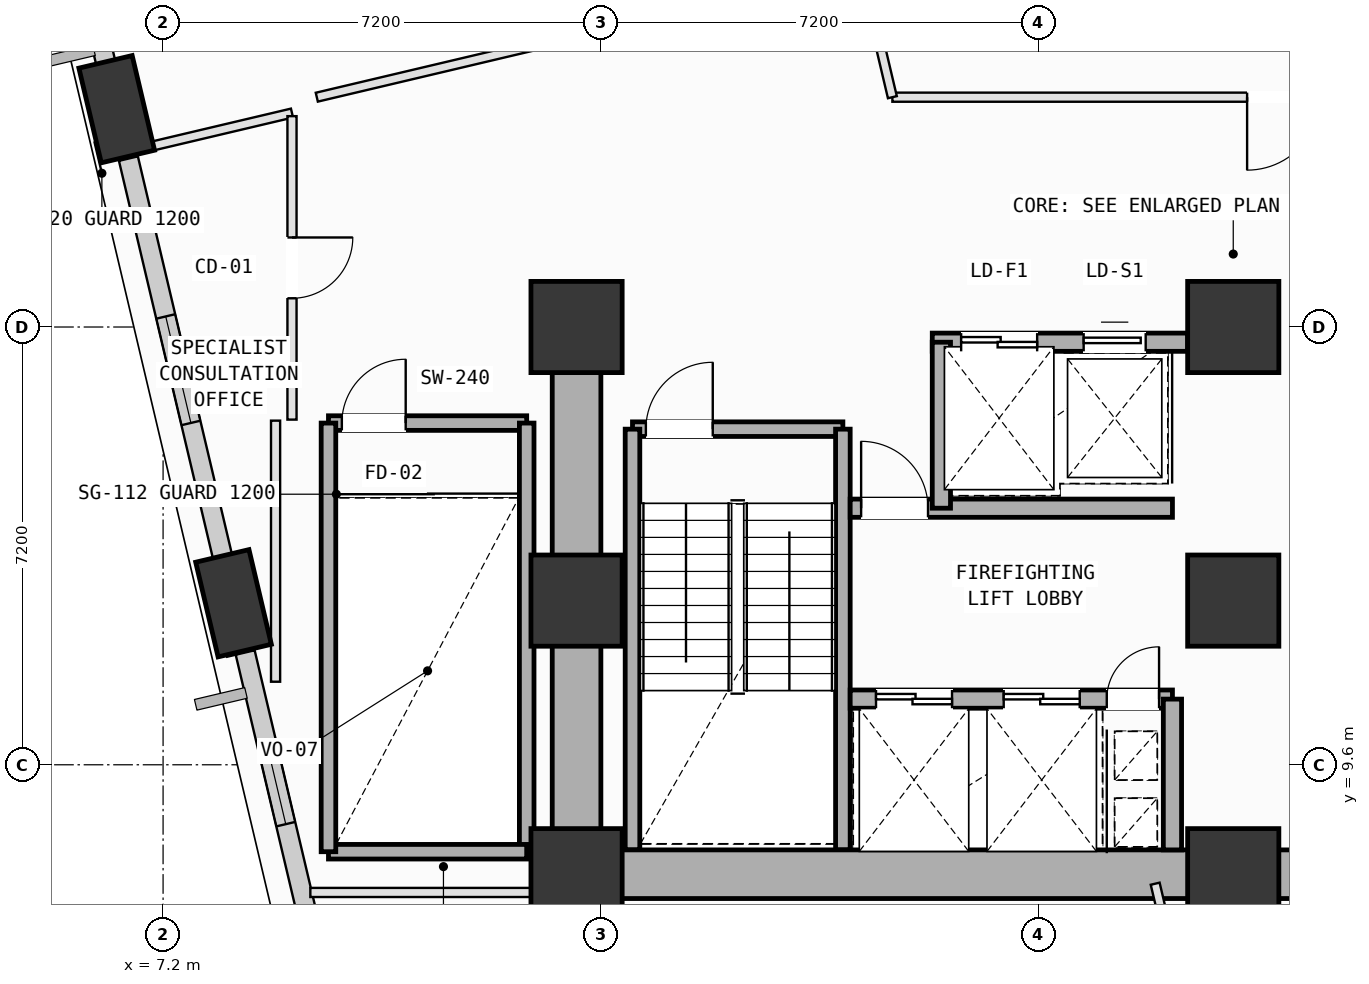
"""IFC4 building model, lengths in metres.
Left out: names, types, materials, properties, quantities, classifications, styles, units other than length and angle.
Written with IfcOpenShell. Run it as: python <this file> out.ifc"""

import sys

from ifc_helpers import new_model, si_unit, direction, frame, frame_2d, origin, origin_2d, place, context, subcontext, project, spatial, rectangle, extrude, element, fill, save


model = new_model("IFC4")
c1 = context("Model", 3, precision=1e-05, world=origin(), true_north=direction((0.0, 1.0)))
c2 = subcontext(c1, "Body", "Model", "MODEL_VIEW")
j1 = project(units=[si_unit("LENGTHUNIT", "METRE"), si_unit("PLANEANGLEUNIT", "RADIAN")], contexts=[c1])
p1 = place(None, origin())
s1 = spatial("IfcSite", under=j1, at=p1, CompositionType="ELEMENT")
p2 = place(p1, origin())
s2 = spatial("IfcBuilding", under=s1, at=p2, CompositionType="ELEMENT")
p3 = place(p2, frame((0.0, 0.0, 79.0)))
s3 = spatial("IfcBuildingStorey", under=s2, at=p3, CompositionType="ELEMENT", Elevation=79.0)
for number, where, z_axis, x_axis in (
    (1, (14.0, 7.8, 0.0), (0.0, 0.0, 1.0), (1.0, 0.0, 0.0)),
    (2, (14.0, 12.3, 0.0), (0.0, 0.0, 1.0), (1.0, 0.0, 0.0)),
    (3, (14.0, 16.8, 0.0), (0.0, 0.0, 1.0), (1.0, 0.0, 0.0)),
    (4, (24.8, 7.8, 0.0), (0.0, 0.0, 1.0), (1.0, 0.0, 0.0)),
    (5, (24.8, 12.3, 0.0), (0.0, 0.0, 1.0), (1.0, 0.0, 0.0)),
    (6, (24.8, 16.8, 0.0), (0.0, 0.0, 1.0), (1.0, 0.0, 0.0)),
):
    element("IfcColumn", number, at=place(p3, frame(where, z_axis=z_axis, x_axis=x_axis)), inside=s3, PredefinedType="COLUMN", context=c2, shape_type="SweptSolid", body=[
        extrude(rectangle(XDim=1.5, YDim=1.5, at=origin_2d()), origin(), (0.0, 0.0, 1.0), 4.0),
    ])
p4 = place(p3, frame((6.438, 20.383, 0.002), z_axis=(0.019115262304, -0.111702868317, 0.993557786924), x_axis=(-0.389846102073, 0.914252031556, 0.110287077643)))
e7 = element("IfcColumn", 7, at=p4, inside=s3, PredefinedType="COLUMN", context=c2, shape_type="SweptSolid", body=[
    extrude(rectangle(XDim=1.6, YDim=0.9, at=origin_2d()), origin(), (0.0, 0.0, 1.0), 3.921),
])
p5 = place(p3, frame((8.359, 12.257, 0.002), z_axis=(0.052505308671, -0.103515804284, 0.993240993327), x_axis=(-0.642416146359, 0.757985593665, 0.112957225061)))
e8 = element("IfcColumn", 8, at=p5, inside=s3, PredefinedType="COLUMN", context=c2, shape_type="SweptSolid", body=[
    extrude(rectangle(XDim=1.6, YDim=0.9, at=origin_2d()), origin(), (0.0, 0.0, 1.0), 3.92),
])
p6 = place(p3, frame((6.35, 20.753, 0.0), z_axis=(0.0, 0.0, 1.0), x_axis=(-0.230050193373, 0.973178764939, 0.0)))
e9 = element("IfcWall", 9, at=p6, inside=s3, PredefinedType="SOLIDWALL", context=c2, shape_type="SweptSolid", body=[
    extrude(rectangle(XDim=5.438, YDim=0.32, at=frame_2d((2.719, 0.0))), origin(), (0.0, 0.0, 1.0), 3.085),
])
p7 = place(p6, frame((1.843, 0.0, 0.75)))
e10 = element("IfcOpeningElement", 10, at=p7, cuts=e9, PredefinedType="OPENING", context=c2, shape_type="SweptSolid", body=[
    extrude(rectangle(XDim=1.4, YDim=1.85, at=frame_2d((0.7, 0.925))), frame((0.0, 0.17, 0.0), z_axis=(0.0, -1.0, 0.0), x_axis=(1.0, 0.0, 0.0)), (0.0, 0.0, 1.0), 0.34),
])
p8 = place(p3, frame((8.271, 12.625, 0.0), z_axis=(0.0, 0.0, 1.0), x_axis=(-0.230038414449, 0.97318154929, 0.0)))
e11 = element("IfcWall", 11, at=p8, inside=s3, PredefinedType="SOLIDWALL", context=c2, shape_type="SweptSolid", body=[
    extrude(rectangle(XDim=7.136, YDim=0.32, at=frame_2d((3.568, 0.0))), origin(), (0.0, 0.0, 1.0), 3.085),
])
p9 = place(p8, frame((2.669, 0.0, 0.75)))
e12 = element("IfcOpeningElement", 12, at=p9, cuts=e11, PredefinedType="OPENING", context=c2, shape_type="SweptSolid", body=[
    extrude(rectangle(XDim=1.8, YDim=2.05, at=frame_2d((0.9, 1.025))), frame((0.0, 0.17, 0.0), z_axis=(0.0, -1.0, 0.0), x_axis=(1.0, 0.0, 0.0)), (0.0, 0.0, 1.0), 0.34),
])
p10 = place(p3, frame((9.93, 5.61, 0.0), z_axis=(0.0, 0.0, 1.0), x_axis=(-0.230053494691, 0.973177984533, 0.0)))
e13 = element("IfcWall", 13, at=p10, inside=s3, PredefinedType="SOLIDWALL", context=c2, shape_type="SweptSolid", body=[
    extrude(rectangle(XDim=5.997, YDim=0.32, at=frame_2d((2.999, 0.0))), origin(), (0.0, 0.0, 1.0), 3.085),
])
p11 = place(p10, frame((3.096, 0.0, 0.75)))
e14 = element("IfcOpeningElement", 14, at=p11, cuts=e13, PredefinedType="OPENING", context=c2, shape_type="SweptSolid", body=[
    extrude(rectangle(XDim=1.2, YDim=1.75, at=frame_2d((0.6, 0.875))), frame((0.0, 0.17, 0.0), z_axis=(0.0, -1.0, 0.0), x_axis=(1.0, 0.0, 0.0)), (0.0, 0.0, 1.0), 0.34),
])
p12 = place(p3, frame((14.92, 15.12, 0.0), z_axis=(0.0, 0.0, 1.0), x_axis=(1.0, 0.0, 0.0)))
e15 = element("IfcWall", 15, at=p12, inside=s3, PredefinedType="SOLIDWALL", context=c2, shape_type="SweptSolid", body=[
    extrude(rectangle(XDim=3.46, YDim=0.24, at=frame_2d((1.73, 0.0))), origin(), (0.0, 0.0, 1.0), 3.7),
])
p13 = place(p12, frame((0.22, 0.0, 0.0)))
e16 = element("IfcOpeningElement", 16, at=p13, cuts=e15, PredefinedType="OPENING", context=c2, shape_type="SweptSolid", body=[
    extrude(rectangle(XDim=1.1, YDim=2.15, at=frame_2d((0.55, 1.075))), frame((0.0, 0.13, 0.0), z_axis=(0.0, -1.0, 0.0), x_axis=(1.0, 0.0, 0.0)), (0.0, 0.0, 1.0), 0.26),
])
for number, where, z_axis, x_axis in (
    (17, (18.38, 15.12, 0.0), (0.0, 0.0, 1.0), (0.0, -1.0, 0.0)),
    (18, (14.92, 8.2, 0.0), (0.0, 0.0, 1.0), (0.0, 1.0, 0.0)),
):
    element("IfcWall", number, at=place(p3, frame(where, z_axis=z_axis, x_axis=x_axis)), inside=s3, PredefinedType="SOLIDWALL", context=c2, shape_type="SweptSolid", body=[
        extrude(rectangle(XDim=6.92, YDim=0.24, at=frame_2d((3.46, 0.0))), origin(), (0.0, 0.0, 1.0), 3.7),
    ])
p14 = place(p3, frame((9.92, 15.22, 0.0), z_axis=(0.0, 0.0, 1.0), x_axis=(1.0, 0.0, 0.0)))
e19 = element("IfcWall", 19, at=p14, inside=s3, PredefinedType="SOLIDWALL", context=c2, shape_type="SweptSolid", body=[
    extrude(rectangle(XDim=3.26, YDim=0.24, at=frame_2d((1.63, 0.0))), origin(), (0.0, 0.0, 1.0), 3.7),
])
p15 = place(p14, frame((0.22, 0.0, 0.0)))
e20 = element("IfcOpeningElement", 20, at=p15, cuts=e19, PredefinedType="OPENING", context=c2, shape_type="SweptSolid", body=[
    extrude(rectangle(XDim=1.05, YDim=2.15, at=frame_2d((0.525, 1.075))), frame((0.0, 0.13, 0.0), z_axis=(0.0, -1.0, 0.0), x_axis=(1.0, 0.0, 0.0)), (0.0, 0.0, 1.0), 0.26),
])
p16 = place(p3, frame((13.18, 15.22, 0.0), z_axis=(0.0, 0.0, 1.0), x_axis=(0.0, -1.0, 0.0)))
e21 = element("IfcWall", 21, at=p16, inside=s3, PredefinedType="SOLIDWALL", context=c2, shape_type="SweptSolid", body=[
    extrude(rectangle(XDim=7.05, YDim=0.24, at=frame_2d((3.525, 0.0))), origin(), (0.0, 0.0, 1.0), 3.7),
])
p17 = place(p3, frame((13.18, 8.17, 0.0), z_axis=(0.0, 0.0, 1.0), x_axis=(-1.0, 0.0, 0.0)))
e22 = element("IfcWall", 22, at=p17, inside=s3, PredefinedType="SOLIDWALL", context=c2, shape_type="SweptSolid", body=[
    extrude(rectangle(XDim=3.26, YDim=0.24, at=frame_2d((1.63, 0.0))), origin(), (0.0, 0.0, 1.0), 3.7),
])
p18 = place(p3, frame((9.92, 8.17, 0.0), z_axis=(0.0, 0.0, 1.0), x_axis=(0.0, 1.0, 0.0)))
e23 = element("IfcWall", 23, at=p18, inside=s3, PredefinedType="SOLIDWALL", context=c2, shape_type="SweptSolid", body=[
    extrude(rectangle(XDim=7.05, YDim=0.24, at=frame_2d((3.525, 0.0))), origin(), (0.0, 0.0, 1.0), 3.7),
])
for number, where, z_axis, x_axis in (
    (24, (14.0, 7.8, 0.0), (0.0, 0.0, 1.0), (1.0, 0.0, 0.0)),
    (25, (24.8, 7.8, 0.0), (0.0, 0.0, 1.0), (1.0, 0.0, 0.0)),
):
    element("IfcWall", number, at=place(p3, frame(where, z_axis=z_axis, x_axis=x_axis)), inside=s3, PredefinedType="SHEAR", context=c2, shape_type="SweptSolid", body=[
        extrude(rectangle(XDim=10.8, YDim=0.8, at=frame_2d((5.4, 0.0))), origin(), (0.0, 0.0, 1.0), 3.7),
    ])
p19 = place(p3, frame((14.0, 16.8, 0.0), z_axis=(0.0, 0.0, 1.0), x_axis=(0.0, -1.0, 0.0)))
e26 = element("IfcWall", 26, at=p19, inside=s3, PredefinedType="SHEAR", context=c2, shape_type="SweptSolid", body=[
    extrude(rectangle(XDim=9.0, YDim=0.8, at=frame_2d((4.5, 0.0))), origin(), (0.0, 0.0, 1.0), 3.7),
])
p20 = place(p3, frame((19.85, 16.55, 0.0), z_axis=(0.0, 0.0, 1.0), x_axis=(1.0, 0.0, 0.0)))
e27 = element("IfcWall", 27, at=p20, inside=s3, PredefinedType="SOLIDWALL", context=c2, shape_type="SweptSolid", body=[
    extrude(rectangle(XDim=4.2, YDim=0.3, at=frame_2d((2.1, 0.0))), origin(), (0.0, 0.0, 1.0), 3.7),
])
p21 = place(p20, frame((0.475, 0.0, 0.0)))
e28 = element("IfcOpeningElement", 28, at=p21, cuts=e27, PredefinedType="OPENING", context=c2, shape_type="SweptSolid", body=[
    extrude(rectangle(XDim=1.25, YDim=2.18, at=frame_2d((0.625, 1.09))), frame((0.0, 0.16, 0.0), z_axis=(0.0, -1.0, 0.0), x_axis=(1.0, 0.0, 0.0)), (0.0, 0.0, 1.0), 0.32),
])
p22 = place(p20, frame((2.49, 0.0, 0.0)))
e29 = element("IfcOpeningElement", 29, at=p22, cuts=e27, PredefinedType="OPENING", context=c2, shape_type="SweptSolid", body=[
    extrude(rectangle(XDim=1.02, YDim=2.12, at=frame_2d((0.51, 1.06))), frame((0.0, 0.16, 0.0), z_axis=(0.0, -1.0, 0.0), x_axis=(1.0, 0.0, 0.0)), (0.0, 0.0, 1.0), 0.32),
])
p23 = place(p3, frame((18.5, 10.68, 0.0), z_axis=(0.0, 0.0, 1.0), x_axis=(1.0, 0.0, 0.0)))
e30 = element("IfcWall", 30, at=p23, inside=s3, PredefinedType="SOLIDWALL", context=c2, shape_type="SweptSolid", body=[
    extrude(rectangle(XDim=5.3, YDim=0.3, at=frame_2d((2.65, 0.0))), origin(), (0.0, 0.0, 1.0), 3.7),
])
p24 = place(p23, frame((4.22, 0.0, 0.0)))
e31 = element("IfcOpeningElement", 31, at=p24, cuts=e30, PredefinedType="OPENING", context=c2, shape_type="SweptSolid", body=[
    extrude(rectangle(XDim=0.86, YDim=2.06, at=frame_2d((0.43, 1.03))), frame((0.0, 0.16, 0.0), z_axis=(0.0, -1.0, 0.0), x_axis=(1.0, 0.0, 0.0)), (0.0, 0.0, 1.0), 0.32),
])
p25 = place(p23, frame((0.425, 0.0, 0.0)))
e32 = element("IfcOpeningElement", 32, at=p25, cuts=e30, PredefinedType="OPENING", context=c2, shape_type="SweptSolid", body=[
    extrude(rectangle(XDim=1.25, YDim=2.18, at=frame_2d((0.625, 1.09))), frame((0.0, 0.16, 0.0), z_axis=(0.0, -1.0, 0.0), x_axis=(1.0, 0.0, 0.0)), (0.0, 0.0, 1.0), 0.32),
])
p26 = place(p23, frame((2.525, 0.0, 0.0)))
e33 = element("IfcOpeningElement", 33, at=p26, cuts=e30, PredefinedType="OPENING", context=c2, shape_type="SweptSolid", body=[
    extrude(rectangle(XDim=1.25, YDim=2.18, at=frame_2d((0.625, 1.09))), frame((0.0, 0.16, 0.0), z_axis=(0.0, -1.0, 0.0), x_axis=(1.0, 0.0, 0.0)), (0.0, 0.0, 1.0), 0.32),
])
p27 = place(p3, frame((18.5, 13.82, 0.0), z_axis=(0.0, 0.0, 1.0), x_axis=(1.0, 0.0, 0.0)))
e34 = element("IfcWall", 34, at=p27, inside=s3, PredefinedType="SOLIDWALL", context=c2, shape_type="SweptSolid", body=[
    extrude(rectangle(XDim=5.3, YDim=0.3, at=frame_2d((2.65, 0.0))), origin(), (0.0, 0.0, 1.0), 3.7),
])
p28 = place(p27, frame((0.18, 0.0, 0.0)))
e35 = element("IfcOpeningElement", 35, at=p28, cuts=e34, PredefinedType="OPENING", context=c2, shape_type="SweptSolid", body=[
    extrude(rectangle(XDim=1.1, YDim=2.15, at=frame_2d((0.55, 1.075))), frame((0.0, 0.16, 0.0), z_axis=(0.0, -1.0, 0.0), x_axis=(1.0, 0.0, 0.0)), (0.0, 0.0, 1.0), 0.32),
])
p29 = place(p3, frame((23.8, 8.2, 0.0), z_axis=(0.0, 0.0, 1.0), x_axis=(0.0, 1.0, 0.0)))
e36 = element("IfcWall", 36, at=p29, inside=s3, PredefinedType="SOLIDWALL", context=c2, shape_type="SweptSolid", body=[
    extrude(rectangle(XDim=2.48, YDim=0.3, at=frame_2d((1.24, 0.0))), origin(), (0.0, 0.0, 1.0), 3.7),
])
p30 = place(p3, frame((20.0, 13.82, 0.0), z_axis=(0.0, 0.0, 1.0), x_axis=(0.0, 1.0, 0.0)))
e37 = element("IfcWall", 37, at=p30, inside=s3, PredefinedType="SOLIDWALL", context=c2, shape_type="SweptSolid", body=[
    extrude(rectangle(XDim=2.73, YDim=0.3, at=frame_2d((1.365, 0.0))), origin(), (0.0, 0.0, 1.0), 3.7),
])
p31 = place(p3, frame((9.622, 7.5, 0.0), z_axis=(0.0, 0.0, 1.0), x_axis=(1.0, 0.0, 0.0)))
e38 = element("IfcWall", 38, at=p31, inside=s3, PredefinedType="PARTITIONING", context=c2, shape_type="SweptSolid", body=[
    extrude(rectangle(XDim=4.378, YDim=0.15, at=frame_2d((2.189, 0.0))), origin(), (0.0, 0.0, 1.0), 3.7),
])
p32 = place(p3, frame((23.516, 7.644, 0.0), z_axis=(0.0, 0.0, 1.0), x_axis=(0.230141707273, -0.973157127382, 0.0)))
e39 = element("IfcWall", 39, at=p32, inside=s3, PredefinedType="PARTITIONING", context=c2, shape_type="SweptSolid", body=[
    extrude(rectangle(XDim=7.739, YDim=0.15, at=frame_2d((3.869, 0.0))), origin(), (0.0, 0.0, 1.0), 3.7),
])
p33 = place(p32, frame((3.594, 0.0, 0.0)))
e40 = element("IfcOpeningElement", 40, at=p33, cuts=e39, PredefinedType="OPENING", context=c2, shape_type="SweptSolid", body=[
    extrude(rectangle(XDim=0.86, YDim=2.06, at=frame_2d((0.43, 1.03))), frame((0.0, 0.085, 0.0), z_axis=(0.0, -1.0, 0.0), x_axis=(1.0, 0.0, 0.0)), (0.0, 0.0, 1.0), 0.17),
])
p34 = place(p3, frame((9.05, 15.26, 0.0), z_axis=(0.0, 0.0, 1.0), x_axis=(0.0, -1.0, 0.0)))
e41 = element("IfcWall", 41, at=p34, inside=s3, PredefinedType="PARTITIONING", context=c2, shape_type="SweptSolid", body=[
    extrude(rectangle(XDim=4.294, YDim=0.15, at=frame_2d((2.147, 0.0))), origin(), (0.0, 0.0, 1.0), 3.085),
])
p35 = place(p3, frame((8.326, 11.394, 0.0), z_axis=(0.0, 0.0, 1.0), x_axis=(-0.229556496303, 0.973295338017, 0.0)))
e42 = element("IfcWall", 42, at=p35, inside=s3, PredefinedType="PARTITIONING", context=c2, shape_type="SweptSolid", body=[
    extrude(rectangle(XDim=1.21, YDim=0.15, at=frame_2d((0.605, 0.0))), origin(), (0.0, 0.0, 1.0), 3.085),
])
p36 = place(p3, frame((6.68, 19.695, 0.0), z_axis=(0.0, 0.0, 1.0), x_axis=(0.973185345339, 0.230022354604, 0.0)))
e43 = element("IfcWall", 43, at=p36, inside=s3, PredefinedType="PARTITIONING", context=c2, shape_type="SweptSolid", body=[
    extrude(rectangle(XDim=2.713, YDim=0.15, at=frame_2d((1.356, 0.0))), origin(), (0.0, 0.0, 1.0), 3.7),
])
p37 = place(p3, frame((9.32, 20.268, 0.0), z_axis=(0.0, 0.0, 1.0), x_axis=(0.0, -1.0, 0.0)))
e44 = element("IfcWall", 44, at=p37, inside=s3, PredefinedType="PARTITIONING", context=c2, shape_type="SweptSolid", body=[
    extrude(rectangle(XDim=4.991, YDim=0.15, at=frame_2d((2.496, 0.0))), origin(), (0.0, 0.0, 1.0), 3.7),
])
p38 = place(p37, frame((1.996, 0.0, 0.0)))
e45 = element("IfcOpeningElement", 45, at=p38, cuts=e44, PredefinedType="OPENING", context=c2, shape_type="SweptSolid", body=[
    extrude(rectangle(XDim=1.0, YDim=2.12, at=frame_2d((0.5, 1.06))), frame((0.0, 0.085, 0.0), z_axis=(0.0, -1.0, 0.0), x_axis=(1.0, 0.0, 0.0)), (0.0, 0.0, 1.0), 0.17),
])
p39 = place(p3, frame((6.344, 19.78, 0.0), z_axis=(0.0, 0.0, 1.0), x_axis=(-0.229629572874, 0.973278099652, 0.0)))
e46 = element("IfcWall", 46, at=p39, inside=s3, PredefinedType="PARTITIONING", context=c2, shape_type="SweptSolid", body=[
    extrude(rectangle(XDim=0.945, YDim=0.15, at=frame_2d((0.473, 0.0))), origin(), (0.0, 0.0, 1.0), 3.085),
])
p40 = place(p3, frame((15.861, 22.03, 0.0), z_axis=(0.0, 0.0, 1.0), x_axis=(-0.973173259021, -0.230073483752, 0.0)))
e47 = element("IfcWall", 47, at=p40, inside=s3, PredefinedType="PARTITIONING", context=c2, shape_type="SweptSolid", body=[
    extrude(rectangle(XDim=6.302, YDim=0.15, at=frame_2d((3.151, 0.0))), origin(), (0.0, 0.0, 1.0), 3.7),
])
p41 = place(p3, frame((32.062, 20.58, 0.0), z_axis=(0.0, 0.0, 1.0), x_axis=(-1.0, 0.0, 0.0)))
e48 = element("IfcWall", 48, at=p41, inside=s3, PredefinedType="PARTITIONING", context=c2, shape_type="SweptSolid", body=[
    extrude(rectangle(XDim=12.868, YDim=0.15, at=frame_2d((6.434, 0.0))), origin(), (0.0, 0.0, 1.0), 3.7),
])
p42 = place(p41, frame((5.834, 0.0, 0.0)))
e49 = element("IfcOpeningElement", 49, at=p42, cuts=e48, PredefinedType="OPENING", context=c2, shape_type="SweptSolid", body=[
    extrude(rectangle(XDim=1.2, YDim=2.15, at=frame_2d((0.6, 1.075))), frame((0.0, 0.085, 0.0), z_axis=(0.0, -1.0, 0.0), x_axis=(1.0, 0.0, 0.0)), (0.0, 0.0, 1.0), 0.17),
])
p43 = place(p3, frame((19.194, 20.58, 0.0), z_axis=(0.0, 0.0, 1.0), x_axis=(-0.230049112819, 0.973179020372, 0.0)))
e50 = element("IfcWall", 50, at=p43, inside=s3, PredefinedType="PARTITIONING", context=c2, shape_type="SweptSolid", body=[
    extrude(rectangle(XDim=2.843, YDim=0.15, at=frame_2d((1.421, 0.0))), origin(), (0.0, 0.0, 1.0), 3.7),
])
p44 = place(p9, origin())
e51 = element("IfcWindow", 51, at=p44, inside=s3, PartitioningType="SINGLE_PANEL", PredefinedType="WINDOW", context=c2, shape_type="SweptSolid", body=[
    extrude(rectangle(XDim=1.8, YDim=2.05, at=frame_2d((0.9, 1.025))), frame((0.0, 0.03, 0.0), z_axis=(0.0, -1.0, 0.0), x_axis=(1.0, 0.0, 0.0)), (0.0, 0.0, 1.0), 0.06),
])
fill(e12, e51)
p45 = place(p11, origin())
e52 = element("IfcWindow", 52, at=p45, inside=s3, PartitioningType="SINGLE_PANEL", PredefinedType="WINDOW", context=c2, shape_type="SweptSolid", body=[
    extrude(rectangle(XDim=1.2, YDim=1.75, at=frame_2d((0.6, 0.875))), frame((0.0, 0.03, 0.0), z_axis=(0.0, -1.0, 0.0), x_axis=(1.0, 0.0, 0.0)), (0.0, 0.0, 1.0), 0.06),
])
fill(e14, e52)
p46 = place(p13, origin())
e53 = element("IfcDoor", 53, at=p46, inside=s3, OperationType="SINGLE_SWING_RIGHT", PredefinedType="DOOR", context=c2, shape_type="SweptSolid", body=[
    extrude(rectangle(XDim=1.1, YDim=2.15, at=frame_2d((0.55, 1.075))), frame((0.0, 0.025, 0.0), z_axis=(0.0, -1.0, 0.0), x_axis=(1.0, 0.0, 0.0)), (0.0, 0.0, 1.0), 0.05),
])
fill(e16, e53)
p47 = place(p15, origin())
e54 = element("IfcDoor", 54, at=p47, inside=s3, OperationType="SINGLE_SWING_RIGHT", PredefinedType="DOOR", context=c2, shape_type="SweptSolid", body=[
    extrude(rectangle(XDim=1.05, YDim=2.15, at=frame_2d((0.525, 1.075))), frame((0.0, 0.025, 0.0), z_axis=(0.0, -1.0, 0.0), x_axis=(1.0, 0.0, 0.0)), (0.0, 0.0, 1.0), 0.05),
])
fill(e20, e54)
p48 = place(p24, origin())
e55 = element("IfcDoor", 55, at=p48, inside=s3, OperationType="SINGLE_SWING_RIGHT", PredefinedType="DOOR", context=c2, shape_type="SweptSolid", body=[
    extrude(rectangle(XDim=0.86, YDim=2.06, at=frame_2d((0.43, 1.03))), frame((0.0, 0.025, 0.0), z_axis=(0.0, -1.0, 0.0), x_axis=(1.0, 0.0, 0.0)), (0.0, 0.0, 1.0), 0.05),
])
fill(e31, e55)
p49 = place(p28, origin())
e56 = element("IfcDoor", 56, at=p49, inside=s3, OperationType="SINGLE_SWING_LEFT", PredefinedType="DOOR", context=c2, shape_type="SweptSolid", body=[
    extrude(rectangle(XDim=1.1, YDim=2.15, at=frame_2d((0.55, 1.075))), frame((0.0, 0.025, 0.0), z_axis=(0.0, -1.0, 0.0), x_axis=(1.0, 0.0, 0.0)), (0.0, 0.0, 1.0), 0.05),
])
fill(e35, e56)
p50 = place(p25, origin())
e57 = element("IfcDoor", 57, at=p50, inside=s3, OperationType="DOUBLE_DOOR_SLIDING", PredefinedType="DOOR", context=c2, shape_type="SweptSolid", body=[
    extrude(rectangle(XDim=1.25, YDim=2.18, at=frame_2d((0.625, 1.09))), frame((0.0, 0.025, 0.0), z_axis=(0.0, -1.0, 0.0), x_axis=(1.0, 0.0, 0.0)), (0.0, 0.0, 1.0), 0.05),
])
fill(e32, e57)
p51 = place(p26, origin())
e58 = element("IfcDoor", 58, at=p51, inside=s3, OperationType="DOUBLE_DOOR_SLIDING", PredefinedType="DOOR", context=c2, shape_type="SweptSolid", body=[
    extrude(rectangle(XDim=1.25, YDim=2.18, at=frame_2d((0.625, 1.09))), frame((0.0, 0.025, 0.0), z_axis=(0.0, -1.0, 0.0), x_axis=(1.0, 0.0, 0.0)), (0.0, 0.0, 1.0), 0.05),
])
fill(e33, e58)
p52 = place(p21, origin())
e59 = element("IfcDoor", 59, at=p52, inside=s3, OperationType="DOUBLE_DOOR_SLIDING", PredefinedType="DOOR", context=c2, shape_type="SweptSolid", body=[
    extrude(rectangle(XDim=1.25, YDim=2.18, at=frame_2d((0.625, 1.09))), frame((0.0, 0.025, 0.0), z_axis=(0.0, -1.0, 0.0), x_axis=(1.0, 0.0, 0.0)), (0.0, 0.0, 1.0), 0.05),
])
fill(e28, e59)
p53 = place(p22, origin())
e60 = element("IfcDoor", 60, at=p53, inside=s3, OperationType="SLIDING_TO_LEFT", PredefinedType="DOOR", context=c2, shape_type="SweptSolid", body=[
    extrude(rectangle(XDim=1.02, YDim=2.12, at=frame_2d((0.51, 1.06))), frame((0.0, 0.025, 0.0), z_axis=(0.0, -1.0, 0.0), x_axis=(1.0, 0.0, 0.0)), (0.0, 0.0, 1.0), 0.05),
])
fill(e29, e60)
p54 = place(p38, origin())
e61 = element("IfcDoor", 61, at=p54, inside=s3, OperationType="SINGLE_SWING_LEFT", PredefinedType="DOOR", context=c2, shape_type="SweptSolid", body=[
    extrude(rectangle(XDim=1.0, YDim=2.12, at=frame_2d((0.5, 1.06))), frame((0.0, 0.025, 0.0), z_axis=(0.0, -1.0, 0.0), x_axis=(1.0, 0.0, 0.0)), (0.0, 0.0, 1.0), 0.05),
])
fill(e45, e61)
p55 = place(p42, origin())
e62 = element("IfcDoor", 62, at=p55, inside=s3, OperationType="SINGLE_SWING_RIGHT", PredefinedType="DOOR", context=c2, shape_type="SweptSolid", body=[
    extrude(rectangle(XDim=1.2, YDim=2.15, at=frame_2d((0.6, 1.075))), frame((0.0, 0.025, 0.0), z_axis=(0.0, -1.0, 0.0), x_axis=(1.0, 0.0, 0.0)), (0.0, 0.0, 1.0), 0.05),
])
fill(e49, e62)
save(model, sys.argv[1])
